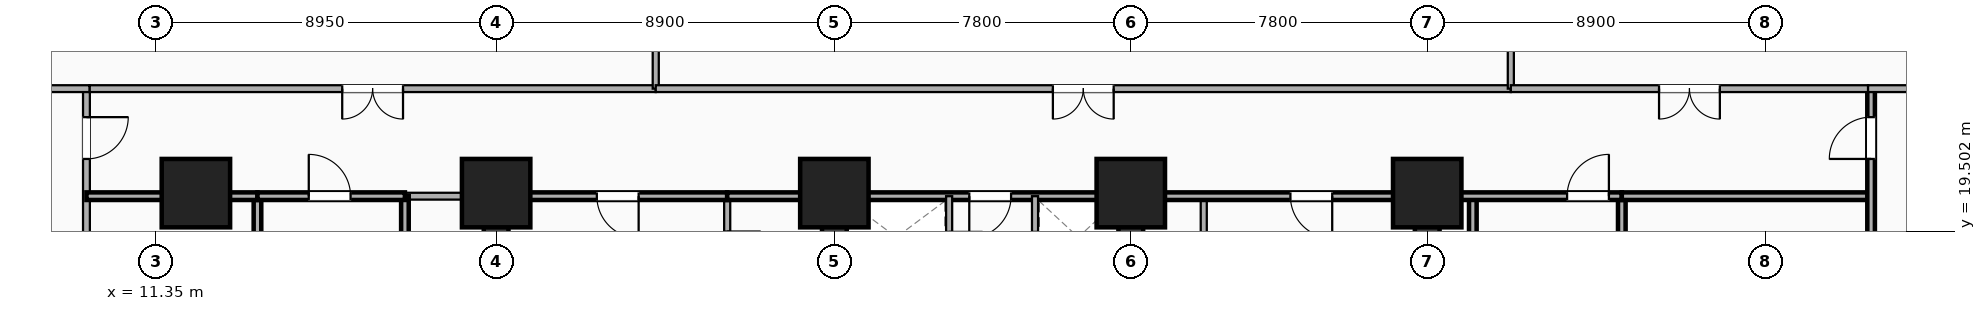
"""IFC4 building model, lengths in metres.
Left out: names, types, materials, properties, quantities, classifications, styles, units other than length and angle.
Written with IfcOpenShell. Run it as: python <this file> out.ifc"""

import sys

from ifc_helpers import new_model, si_unit, direction, frame, frame_2d, origin, origin_2d, place, context, subcontext, project, spatial, rectangle, extrude, element, fill, save


model = new_model("IFC4")
c1 = context("Model", 3, precision=1e-05, world=origin(), true_north=direction((0.0, 1.0)))
c2 = subcontext(c1, "Body", "Model", "MODEL_VIEW")
j1 = project(units=[si_unit("LENGTHUNIT", "METRE"), si_unit("PLANEANGLEUNIT", "RADIAN")], contexts=[c1])
p1 = place(None, origin())
s1 = spatial("IfcSite", under=j1, at=p1, CompositionType="ELEMENT")
p2 = place(p1, origin())
s2 = spatial("IfcBuilding", under=s1, at=p2, CompositionType="ELEMENT")
p3 = place(p2, frame((0.0, 0.0, 5.4)))
s3 = spatial("IfcBuildingStorey", under=s2, at=p3, CompositionType="ELEMENT", Elevation=5.4)
for number, where, z_axis, x_axis in (
    (1, (20.3, 3.5, 0.0), (0.0, 0.0, 1.0), (0.0, 1.0, 0.0)),
    (2, (44.8, 3.5, 0.0), (0.0, 0.0, 1.0), (0.0, 1.0, 0.0)),
):
    element("IfcWall", number, at=place(p3, frame(where, z_axis=z_axis, x_axis=x_axis)), inside=s3, PredefinedType="SHEAR", context=c2, shape_type="SweptSolid", body=[
        extrude(rectangle(XDim=16.9, YDim=0.65, at=frame_2d((8.45, 0.0))), origin(), (0.0, 0.0, 1.0), 4.3),
    ])
p4 = place(p3, frame((29.2, 3.5, 0.0), z_axis=(0.0, 0.0, 1.0), x_axis=(0.0, 1.0, 0.0)))
e3 = element("IfcWall", 3, at=p4, inside=s3, PredefinedType="SHEAR", context=c2, shape_type="SweptSolid", body=[
    extrude(rectangle(XDim=16.9, YDim=0.65, at=frame_2d((8.45, 0.0))), origin(), (0.0, 0.0, 1.0), 4.3),
])
p5 = place(p4, frame((7.75, 0.0, 0.0), z_axis=(0.0, 0.0, 1.0), x_axis=(-1.0, 0.0, 0.0)))
e4 = element("IfcOpeningElement", 4, at=p5, cuts=e3, PredefinedType="OPENING", context=c2, shape_type="SweptSolid", body=[
    extrude(rectangle(XDim=1.1, YDim=2.15, at=frame_2d((0.55, 1.075))), frame((0.0, 0.335, 0.0), z_axis=(0.0, -1.0, 0.0), x_axis=(1.0, 0.0, 0.0)), (0.0, 0.0, 1.0), 0.67),
])
p6 = place(p3, frame((37.0, 3.5, 0.0), z_axis=(0.0, 0.0, 1.0), x_axis=(0.0, 1.0, 0.0)))
e5 = element("IfcWall", 5, at=p6, inside=s3, PredefinedType="SHEAR", context=c2, shape_type="SweptSolid", body=[
    extrude(rectangle(XDim=16.9, YDim=0.65, at=frame_2d((8.45, 0.0))), origin(), (0.0, 0.0, 1.0), 4.3),
])
p7 = place(p6, frame((6.65, 0.0, 0.0)))
e6 = element("IfcOpeningElement", 6, at=p7, cuts=e5, PredefinedType="OPENING", context=c2, shape_type="SweptSolid", body=[
    extrude(rectangle(XDim=1.1, YDim=2.15, at=frame_2d((0.55, 1.075))), frame((0.0, 0.335, 0.0), z_axis=(0.0, -1.0, 0.0), x_axis=(1.0, 0.0, 0.0)), (0.0, 0.0, 1.0), 0.67),
])
for number, where, z_axis, x_axis in (
    (7, (20.3, 20.5, -0.3), (0.0, 0.0, 1.0), (1.0, 0.0, 0.0)),
    (8, (29.2, 20.5, -0.3), (0.0, 0.0, 1.0), (1.0, 0.0, 0.0)),
    (9, (37.0, 20.5, -0.3), (0.0, 0.0, 1.0), (1.0, 0.0, 0.0)),
    (10, (44.8, 20.5, -0.3), (0.0, 0.0, 1.0), (1.0, 0.0, 0.0)),
    (11, (12.4, 20.5, -0.3), (0.0, 0.0, 1.0), (1.0, 0.0, 0.0)),
):
    element("IfcColumn", number, at=place(p3, frame(where, z_axis=z_axis, x_axis=x_axis)), inside=s3, PredefinedType="COLUMN", context=c2, shape_type="SweptSolid", body=[
        extrude(rectangle(XDim=1.8, YDim=1.8, at=origin_2d()), origin(), (0.0, 0.0, 1.0), 4.6),
    ])
p8 = place(p3, frame((26.38, 17.76, 0.0), z_axis=(0.0, 0.0, 1.0), x_axis=(0.0, 1.0, 0.0)))
e12 = element("IfcWall", 12, at=p8, inside=s3, PredefinedType="PARTITIONING", context=c2, shape_type="SweptSolid", body=[
    extrude(rectangle(XDim=2.66, YDim=0.16, at=frame_2d((1.33, 0.0))), origin(), (0.0, 0.0, 1.0), 2.635),
])
p9 = place(p8, frame((0.85, 0.0, 0.0)))
e13 = element("IfcOpeningElement", 13, at=p9, cuts=e12, PredefinedType="OPENING", context=c2, shape_type="SweptSolid", body=[
    extrude(rectangle(XDim=0.88, YDim=2.08, at=frame_2d((0.44, 1.04))), frame((0.0, 0.09, 0.0), z_axis=(0.0, -1.0, 0.0), x_axis=(1.0, 0.0, 0.0)), (0.0, 0.0, 1.0), 0.18),
])
p10 = place(p3, frame((38.92, 17.76, 0.0), z_axis=(0.0, 0.0, 1.0), x_axis=(0.0, 1.0, 0.0)))
e14 = element("IfcWall", 14, at=p10, inside=s3, PredefinedType="PARTITIONING", context=c2, shape_type="SweptSolid", body=[
    extrude(rectangle(XDim=2.66, YDim=0.16, at=frame_2d((1.33, 0.0))), origin(), (0.0, 0.0, 1.0), 3.373),
])
p11 = place(p10, frame((1.14, 0.0, 0.0), z_axis=(0.0, 0.0, 1.0), x_axis=(-1.0, 0.0, 0.0)))
e15 = element("IfcOpeningElement", 15, at=p11, cuts=e14, PredefinedType="OPENING", context=c2, shape_type="SweptSolid", body=[
    extrude(rectangle(XDim=0.92, YDim=2.08, at=frame_2d((0.46, 1.04))), frame((0.0, 0.09, 0.0), z_axis=(0.0, -1.0, 0.0), x_axis=(1.0, 0.0, 0.0)), (0.0, 0.0, 1.0), 0.18),
])
p12 = place(p3, frame((20.65, 20.42, 0.0), z_axis=(0.0, 0.0, 1.0), x_axis=(1.0, 0.0, 0.0)))
e16 = element("IfcWall", 16, at=p12, inside=s3, PredefinedType="PARTITIONING", context=c2, shape_type="SweptSolid", body=[
    extrude(rectangle(XDim=5.73, YDim=0.2, at=frame_2d((2.865, 0.0))), origin(), (0.0, 0.0, 1.0), 2.635),
])
p13 = place(p12, frame((2.3, 0.0, 0.0)))
e17 = element("IfcOpeningElement", 17, at=p13, cuts=e16, PredefinedType="OPENING", context=c2, shape_type="SweptSolid", body=[
    extrude(rectangle(XDim=1.1, YDim=2.15, at=frame_2d((0.55, 1.075))), frame((0.0, 0.11, 0.0), z_axis=(0.0, -1.0, 0.0), x_axis=(1.0, 0.0, 0.0)), (0.0, 0.0, 1.0), 0.22),
])
p14 = place(p3, frame((26.38, 20.42, 0.0), z_axis=(0.0, 0.0, 1.0), x_axis=(1.0, 0.0, 0.0)))
e18 = element("IfcWall", 18, at=p14, inside=s3, PredefinedType="PARTITIONING", context=c2, shape_type="SweptSolid", body=[
    extrude(rectangle(XDim=2.82, YDim=0.2, at=frame_2d((1.41, 0.0))), origin(), (0.0, 0.0, 1.0), 2.635),
])
p15 = place(p3, frame((29.2, 20.42, 0.0), z_axis=(0.0, 0.0, 1.0), x_axis=(1.0, 0.0, 0.0)))
e19 = element("IfcWall", 19, at=p15, inside=s3, PredefinedType="PARTITIONING", context=c2, shape_type="SweptSolid", body=[
    extrude(rectangle(XDim=7.8, YDim=0.2, at=frame_2d((3.9, 0.0))), origin(), (0.0, 0.0, 1.0), 2.635),
])
p16 = place(p15, frame((3.55, 0.0, 0.0)))
e20 = element("IfcOpeningElement", 20, at=p16, cuts=e19, PredefinedType="OPENING", context=c2, shape_type="SweptSolid", body=[
    extrude(rectangle(XDim=1.1, YDim=2.15, at=frame_2d((0.55, 1.075))), frame((0.0, 0.11, 0.0), z_axis=(0.0, -1.0, 0.0), x_axis=(1.0, 0.0, 0.0)), (0.0, 0.0, 1.0), 0.22),
])
p17 = place(p3, frame((37.0, 20.42, 0.0), z_axis=(0.0, 0.0, 1.0), x_axis=(1.0, 0.0, 0.0)))
e21 = element("IfcWall", 21, at=p17, inside=s3, PredefinedType="PARTITIONING", context=c2, shape_type="SweptSolid", body=[
    extrude(rectangle(XDim=7.45, YDim=0.2, at=frame_2d((3.725, 0.0))), origin(), (0.0, 0.0, 1.0), 3.373),
])
p18 = place(p17, frame((4.2, 0.0, 0.0)))
e22 = element("IfcOpeningElement", 22, at=p18, cuts=e21, PredefinedType="OPENING", context=c2, shape_type="SweptSolid", body=[
    extrude(rectangle(XDim=1.1, YDim=2.15, at=frame_2d((0.55, 1.075))), frame((0.0, 0.11, 0.0), z_axis=(0.0, -1.0, 0.0), x_axis=(1.0, 0.0, 0.0)), (0.0, 0.0, 1.0), 0.22),
])
p19 = place(p3, frame((32.22, 12.5, 0.0), z_axis=(0.0, 0.0, 1.0), x_axis=(0.0, 1.0, 0.0)))
e23 = element("IfcWall", 23, at=p19, inside=s3, PredefinedType="PARTITIONING", context=c2, shape_type="SweptSolid", body=[
    extrude(rectangle(XDim=7.92, YDim=0.16, at=frame_2d((3.96, 0.0))), origin(), (0.0, 0.0, 1.0), 3.373),
])
p20 = place(p19, frame((6.1, 0.0, 0.0)))
e24 = element("IfcOpeningElement", 24, at=p20, cuts=e23, PredefinedType="OPENING", context=c2, shape_type="SweptSolid", body=[
    extrude(rectangle(XDim=0.88, YDim=2.08, at=frame_2d((0.44, 1.04))), frame((0.0, 0.09, 0.0), z_axis=(0.0, -1.0, 0.0), x_axis=(1.0, 0.0, 0.0)), (0.0, 0.0, 1.0), 0.18),
])
p21 = place(p3, frame((34.48, 12.5, 0.0), z_axis=(0.0, 0.0, 1.0), x_axis=(0.0, 1.0, 0.0)))
e25 = element("IfcWall", 25, at=p21, inside=s3, PredefinedType="PARTITIONING", context=c2, shape_type="SweptSolid", body=[
    extrude(rectangle(XDim=7.92, YDim=0.16, at=frame_2d((3.96, 0.0))), origin(), (0.0, 0.0, 1.0), 3.373),
])
p22 = place(p21, frame((6.98, 0.0, 0.0), z_axis=(0.0, 0.0, 1.0), x_axis=(-1.0, 0.0, 0.0)))
e26 = element("IfcOpeningElement", 26, at=p22, cuts=e25, PredefinedType="OPENING", context=c2, shape_type="SweptSolid", body=[
    extrude(rectangle(XDim=0.88, YDim=2.08, at=frame_2d((0.44, 1.04))), frame((0.0, 0.09, 0.0), z_axis=(0.0, -1.0, 0.0), x_axis=(1.0, 0.0, 0.0)), (0.0, 0.0, 1.0), 0.18),
])
p23 = place(p3, frame((17.9, 20.42, 0.0), z_axis=(0.0, 0.0, 1.0), x_axis=(1.0, 0.0, 0.0)))
e27 = element("IfcWall", 27, at=p23, inside=s3, PredefinedType="PARTITIONING", context=c2, shape_type="SweptSolid", body=[
    extrude(rectangle(XDim=2.4, YDim=0.18, at=frame_2d((1.2, 0.0))), origin(), (0.0, 0.0, 1.0), 2.635),
])
p24 = place(p3, frame((9.52, 0.22, 0.0), z_axis=(0.0, 0.0, 1.0), x_axis=(0.0, 1.0, 0.0)))
e28 = element("IfcWall", 28, at=p24, inside=s3, PredefinedType="PARTITIONING", context=c2, shape_type="SweptSolid", body=[
    extrude(rectangle(XDim=23.03, YDim=0.18, at=frame_2d((11.515, 0.0))), origin(), (0.0, 0.0, 1.0), 4.3),
])
p25 = place(p24, frame((21.18, 0.0, 0.0)))
e29 = element("IfcOpeningElement", 29, at=p25, cuts=e28, PredefinedType="OPENING", context=c2, shape_type="SweptSolid", body=[
    extrude(rectangle(XDim=1.1, YDim=2.15, at=frame_2d((0.55, 1.075))), frame((0.0, 0.1, 0.0), z_axis=(0.0, -1.0, 0.0), x_axis=(1.0, 0.0, 0.0)), (0.0, 0.0, 1.0), 0.2),
])
p26 = place(p3, frame((14.02, 17.42, 0.0), z_axis=(0.0, 0.0, 1.0), x_axis=(0.0, 1.0, 0.0)))
e30 = element("IfcWall", 30, at=p26, inside=s3, PredefinedType="PARTITIONING", context=c2, shape_type="SweptSolid", body=[
    extrude(rectangle(XDim=3.0, YDim=0.2, at=frame_2d((1.5, 0.0))), origin(), (0.0, 0.0, 1.0), 3.373),
])
p27 = place(p26, frame((0.332, 0.0, 0.0)))
e31 = element("IfcOpeningElement", 31, at=p27, cuts=e30, PredefinedType="OPENING", context=c2, shape_type="SweptSolid", body=[
    extrude(rectangle(XDim=0.88, YDim=2.08, at=frame_2d((0.44, 1.04))), frame((0.0, 0.11, 0.0), z_axis=(0.0, -1.0, 0.0), x_axis=(1.0, 0.0, 0.0)), (0.0, 0.0, 1.0), 0.22),
])
p28 = place(p3, frame((17.9, 11.4, 0.0), z_axis=(0.0, 0.0, 1.0), x_axis=(0.0, 1.0, 0.0)))
e32 = element("IfcWall", 32, at=p28, inside=s3, PredefinedType="PARTITIONING", context=c2, shape_type="SweptSolid", body=[
    extrude(rectangle(XDim=9.02, YDim=0.2, at=frame_2d((4.51, 0.0))), origin(), (0.0, 0.0, 1.0), 3.373),
])
p29 = place(p28, frame((4.52, 0.0, 0.0), z_axis=(0.0, 0.0, 1.0), x_axis=(-1.0, 0.0, 0.0)))
e33 = element("IfcOpeningElement", 33, at=p29, cuts=e32, PredefinedType="OPENING", context=c2, shape_type="SweptSolid", body=[
    extrude(rectangle(XDim=0.92, YDim=2.08, at=frame_2d((0.46, 1.04))), frame((0.0, 0.11, 0.0), z_axis=(0.0, -1.0, 0.0), x_axis=(1.0, 0.0, 0.0)), (0.0, 0.0, 1.0), 0.22),
])
p30 = place(p3, frame((9.52, 20.42, 0.0), z_axis=(0.0, 0.0, 1.0), x_axis=(1.0, 0.0, 0.0)))
e34 = element("IfcWall", 34, at=p30, inside=s3, PredefinedType="PARTITIONING", context=c2, shape_type="SweptSolid", body=[
    extrude(rectangle(XDim=4.5, YDim=0.2, at=frame_2d((2.25, 0.0))), origin(), (0.0, 0.0, 1.0), 3.373),
])
p31 = place(p3, frame((14.02, 20.42, 0.0), z_axis=(0.0, 0.0, 1.0), x_axis=(1.0, 0.0, 0.0)))
e35 = element("IfcWall", 35, at=p31, inside=s3, PredefinedType="PARTITIONING", context=c2, shape_type="SweptSolid", body=[
    extrude(rectangle(XDim=3.88, YDim=0.2, at=frame_2d((1.94, 0.0))), origin(), (0.0, 0.0, 1.0), 3.373),
])
p32 = place(p31, frame((2.45, 0.0, 0.0), z_axis=(0.0, 0.0, 1.0), x_axis=(-1.0, 0.0, 0.0)))
e36 = element("IfcOpeningElement", 36, at=p32, cuts=e35, PredefinedType="OPENING", context=c2, shape_type="SweptSolid", body=[
    extrude(rectangle(XDim=1.1, YDim=2.15, at=frame_2d((0.55, 1.075))), frame((0.0, 0.11, 0.0), z_axis=(0.0, -1.0, 0.0), x_axis=(1.0, 0.0, 0.0)), (0.0, 0.0, 1.0), 0.22),
])
p33 = place(p3, frame((46.0, 11.4, 0.0), z_axis=(0.0, 0.0, 1.0), x_axis=(0.0, 1.0, 0.0)))
e37 = element("IfcWall", 37, at=p33, inside=s3, PredefinedType="PARTITIONING", context=c2, shape_type="SweptSolid", body=[
    extrude(rectangle(XDim=9.02, YDim=0.2, at=frame_2d((4.51, 0.0))), origin(), (0.0, 0.0, 1.0), 3.373),
])
p34 = place(p3, frame((49.92, 13.92, 0.0), z_axis=(0.0, 0.0, 1.0), x_axis=(0.0, 1.0, 0.0)))
e38 = element("IfcWall", 38, at=p34, inside=s3, PredefinedType="PARTITIONING", context=c2, shape_type="SweptSolid", body=[
    extrude(rectangle(XDim=6.5, YDim=0.2, at=frame_2d((3.25, 0.0))), origin(), (0.0, 0.0, 1.0), 3.373),
])
p35 = place(p34, frame((3.5, 0.0, 0.0), z_axis=(0.0, 0.0, 1.0), x_axis=(-1.0, 0.0, 0.0)))
e39 = element("IfcOpeningElement", 39, at=p35, cuts=e38, PredefinedType="OPENING", context=c2, shape_type="SweptSolid", body=[
    extrude(rectangle(XDim=1.1, YDim=2.15, at=frame_2d((0.55, 1.075))), frame((0.0, 0.11, 0.0), z_axis=(0.0, -1.0, 0.0), x_axis=(1.0, 0.0, 0.0)), (0.0, 0.0, 1.0), 0.22),
])
p36 = place(p3, frame((44.8, 20.42, 0.0), z_axis=(0.0, 0.0, 1.0), x_axis=(1.0, 0.0, 0.0)))
e40 = element("IfcWall", 40, at=p36, inside=s3, PredefinedType="PARTITIONING", context=c2, shape_type="SweptSolid", body=[
    extrude(rectangle(XDim=5.12, YDim=0.2, at=frame_2d((2.56, 0.0))), origin(), (0.0, 0.0, 1.0), 3.373),
])
p37 = place(p36, frame((4.781, 0.0, 0.0), z_axis=(0.0, 0.0, 1.0), x_axis=(-1.0, 0.0, 0.0)))
e41 = element("IfcOpeningElement", 41, at=p37, cuts=e40, PredefinedType="OPENING", context=c2, shape_type="SweptSolid", body=[
    extrude(rectangle(XDim=1.1, YDim=2.15, at=frame_2d((0.55, 1.075))), frame((0.0, 0.11, 0.0), z_axis=(0.0, -1.0, 0.0), x_axis=(1.0, 0.0, 0.0)), (0.0, 0.0, 1.0), 0.22),
])
p38 = place(p3, frame((49.92, 20.42, 0.0), z_axis=(0.0, 0.0, 1.0), x_axis=(1.0, 0.0, 0.0)))
e42 = element("IfcWall", 42, at=p38, inside=s3, PredefinedType="PARTITIONING", context=c2, shape_type="SweptSolid", body=[
    extrude(rectangle(XDim=6.56, YDim=0.2, at=frame_2d((3.28, 0.0))), origin(), (0.0, 0.0, 1.0), 3.373),
])
p39 = place(p3, frame((56.48, 0.22, 0.0), z_axis=(0.0, 0.0, 1.0), x_axis=(0.0, 1.0, 0.0)))
e43 = element("IfcWall", 43, at=p39, inside=s3, PredefinedType="PARTITIONING", context=c2, shape_type="SweptSolid", body=[
    extrude(rectangle(XDim=23.03, YDim=0.2, at=frame_2d((11.515, 0.0))), origin(), (0.0, 0.0, 1.0), 3.373),
])
p40 = place(p39, frame((22.28, 0.0, 0.0), z_axis=(0.0, 0.0, 1.0), x_axis=(-1.0, 0.0, 0.0)))
e44 = element("IfcOpeningElement", 44, at=p40, cuts=e43, PredefinedType="OPENING", context=c2, shape_type="SweptSolid", body=[
    extrude(rectangle(XDim=1.1, YDim=2.15, at=frame_2d((0.55, 1.075))), frame((0.0, 0.11, 0.0), z_axis=(0.0, -1.0, 0.0), x_axis=(1.0, 0.0, 0.0)), (0.0, 0.0, 1.0), 0.22),
])
p41 = place(p3, frame((9.6, 23.25, 0.0), z_axis=(0.0, 0.0, 1.0), x_axis=(1.0, 0.0, 0.0)))
e45 = element("IfcWall", 45, at=p41, inside=s3, PredefinedType="PARTITIONING", context=c2, shape_type="SweptSolid", body=[
    extrude(rectangle(XDim=14.9, YDim=0.18, at=frame_2d((7.45, 0.0))), origin(), (0.0, 0.0, 1.0), 3.43),
])
p42 = place(p41, frame((6.65, 0.0, 0.0)))
e46 = element("IfcOpeningElement", 46, at=p42, cuts=e45, PredefinedType="OPENING", context=c2, shape_type="SweptSolid", body=[
    extrude(rectangle(XDim=1.6, YDim=2.22, at=frame_2d((0.8, 1.11))), frame((0.0, 0.1, 0.0), z_axis=(0.0, -1.0, 0.0), x_axis=(1.0, 0.0, 0.0)), (0.0, 0.0, 1.0), 0.2),
])
p43 = place(p3, frame((-2.28, 23.25, 0.0), z_axis=(0.0, 0.0, 1.0), x_axis=(1.0, 0.0, 0.0)))
e47 = element("IfcWall", 47, at=p43, inside=s3, PredefinedType="PARTITIONING", context=c2, shape_type="SweptSolid", body=[
    extrude(rectangle(XDim=11.88, YDim=0.18, at=frame_2d((5.94, 0.0))), origin(), (0.0, 0.0, 1.0), 3.43),
])
p44 = place(p3, frame((24.5, 23.25, 0.0), z_axis=(0.0, 0.0, 1.0), x_axis=(0.0, 1.0, 0.0)))
e48 = element("IfcWall", 48, at=p44, inside=s3, PredefinedType="PARTITIONING", context=c2, shape_type="SweptSolid", body=[
    extrude(rectangle(XDim=27.3, YDim=0.16, at=frame_2d((13.65, 0.0))), origin(), (0.0, 0.0, 1.0), 3.373),
])
p45 = place(p3, frame((24.5, 23.25, 0.0), z_axis=(0.0, 0.0, 1.0), x_axis=(1.0, 0.0, 0.0)))
e49 = element("IfcWall", 49, at=p45, inside=s3, PredefinedType="PARTITIONING", context=c2, shape_type="SweptSolid", body=[
    extrude(rectangle(XDim=22.5, YDim=0.18, at=frame_2d((11.25, 0.0))), origin(), (0.0, 0.0, 1.0), 3.43),
])
p46 = place(p45, frame((10.45, 0.0, 0.0)))
e50 = element("IfcOpeningElement", 50, at=p46, cuts=e49, PredefinedType="OPENING", context=c2, shape_type="SweptSolid", body=[
    extrude(rectangle(XDim=1.6, YDim=2.22, at=frame_2d((0.8, 1.11))), frame((0.0, 0.1, 0.0), z_axis=(0.0, -1.0, 0.0), x_axis=(1.0, 0.0, 0.0)), (0.0, 0.0, 1.0), 0.2),
])
p47 = place(p3, frame((47.0, 23.25, 0.0), z_axis=(0.0, 0.0, 1.0), x_axis=(0.0, 1.0, 0.0)))
e51 = element("IfcWall", 51, at=p47, inside=s3, PredefinedType="PARTITIONING", context=c2, shape_type="SweptSolid", body=[
    extrude(rectangle(XDim=27.3, YDim=0.16, at=frame_2d((13.65, 0.0))), origin(), (0.0, 0.0, 1.0), 3.373),
])
p48 = place(p3, frame((47.0, 23.25, 0.0), z_axis=(0.0, 0.0, 1.0), x_axis=(1.0, 0.0, 0.0)))
e52 = element("IfcWall", 52, at=p48, inside=s3, PredefinedType="PARTITIONING", context=c2, shape_type="SweptSolid", body=[
    extrude(rectangle(XDim=9.4, YDim=0.18, at=frame_2d((4.7, 0.0))), origin(), (0.0, 0.0, 1.0), 3.982),
])
p49 = place(p48, frame((3.9, 0.0, 0.0)))
e53 = element("IfcOpeningElement", 53, at=p49, cuts=e52, PredefinedType="OPENING", context=c2, shape_type="SweptSolid", body=[
    extrude(rectangle(XDim=1.6, YDim=2.22, at=frame_2d((0.8, 1.11))), frame((0.0, 0.1, 0.0), z_axis=(0.0, -1.0, 0.0), x_axis=(1.0, 0.0, 0.0)), (0.0, 0.0, 1.0), 0.2),
])
p50 = place(p3, frame((56.4, 23.25, 0.0), z_axis=(0.0, 0.0, 1.0), x_axis=(1.0, 0.0, 0.0)))
e54 = element("IfcWall", 54, at=p50, inside=s3, PredefinedType="PARTITIONING", context=c2, shape_type="SweptSolid", body=[
    extrude(rectangle(XDim=19.38, YDim=0.18, at=frame_2d((9.69, 0.0))), origin(), (0.0, 0.0, 1.0), 3.43),
])
p51 = place(p13, origin())
e55 = element("IfcDoor", 55, at=p51, inside=s3, OperationType="SINGLE_SWING_RIGHT", PredefinedType="DOOR", context=c2, shape_type="SweptSolid", body=[
    extrude(rectangle(XDim=1.1, YDim=2.15, at=frame_2d((0.55, 1.075))), frame((0.0, 0.025, 0.0), z_axis=(0.0, -1.0, 0.0), x_axis=(1.0, 0.0, 0.0)), (0.0, 0.0, 1.0), 0.05),
])
fill(e17, e55)
p52 = place(p16, origin())
e56 = element("IfcDoor", 56, at=p52, inside=s3, OperationType="SINGLE_SWING_LEFT", PredefinedType="DOOR", context=c2, shape_type="SweptSolid", body=[
    extrude(rectangle(XDim=1.1, YDim=2.15, at=frame_2d((0.55, 1.075))), frame((0.0, 0.025, 0.0), z_axis=(0.0, -1.0, 0.0), x_axis=(1.0, 0.0, 0.0)), (0.0, 0.0, 1.0), 0.05),
])
fill(e20, e56)
p53 = place(p18, origin())
e57 = element("IfcDoor", 57, at=p53, inside=s3, OperationType="SINGLE_SWING_RIGHT", PredefinedType="DOOR", context=c2, shape_type="SweptSolid", body=[
    extrude(rectangle(XDim=1.1, YDim=2.15, at=frame_2d((0.55, 1.075))), frame((0.0, 0.025, 0.0), z_axis=(0.0, -1.0, 0.0), x_axis=(1.0, 0.0, 0.0)), (0.0, 0.0, 1.0), 0.05),
])
fill(e22, e57)
p54 = place(p25, origin())
e58 = element("IfcDoor", 58, at=p54, inside=s3, OperationType="SINGLE_SWING_RIGHT", PredefinedType="DOOR", context=c2, shape_type="SweptSolid", body=[
    extrude(rectangle(XDim=1.1, YDim=2.15, at=frame_2d((0.55, 1.075))), frame((0.0, 0.025, 0.0), z_axis=(0.0, -1.0, 0.0), x_axis=(1.0, 0.0, 0.0)), (0.0, 0.0, 1.0), 0.05),
])
fill(e29, e58)
p55 = place(p32, origin())
e59 = element("IfcDoor", 59, at=p55, inside=s3, OperationType="SINGLE_SWING_LEFT", PredefinedType="DOOR", context=c2, shape_type="SweptSolid", body=[
    extrude(rectangle(XDim=1.1, YDim=2.15, at=frame_2d((0.55, 1.075))), frame((0.0, 0.025, 0.0), z_axis=(0.0, -1.0, 0.0), x_axis=(1.0, 0.0, 0.0)), (0.0, 0.0, 1.0), 0.05),
])
fill(e36, e59)
p56 = place(p37, origin())
e60 = element("IfcDoor", 60, at=p56, inside=s3, OperationType="SINGLE_SWING_RIGHT", PredefinedType="DOOR", context=c2, shape_type="SweptSolid", body=[
    extrude(rectangle(XDim=1.1, YDim=2.15, at=frame_2d((0.55, 1.075))), frame((0.0, 0.025, 0.0), z_axis=(0.0, -1.0, 0.0), x_axis=(1.0, 0.0, 0.0)), (0.0, 0.0, 1.0), 0.05),
])
fill(e41, e60)
p57 = place(p40, origin())
e61 = element("IfcDoor", 61, at=p57, inside=s3, OperationType="SINGLE_SWING_LEFT", PredefinedType="DOOR", context=c2, shape_type="SweptSolid", body=[
    extrude(rectangle(XDim=1.1, YDim=2.15, at=frame_2d((0.55, 1.075))), frame((0.0, 0.025, 0.0), z_axis=(0.0, -1.0, 0.0), x_axis=(1.0, 0.0, 0.0)), (0.0, 0.0, 1.0), 0.05),
])
fill(e44, e61)
p58 = place(p42, origin())
e62 = element("IfcDoor", 62, at=p58, inside=s3, OperationType="DOUBLE_DOOR_SINGLE_SWING", PredefinedType="DOOR", context=c2, shape_type="SweptSolid", body=[
    extrude(rectangle(XDim=1.6, YDim=2.22, at=frame_2d((0.8, 1.11))), frame((0.0, 0.025, 0.0), z_axis=(0.0, -1.0, 0.0), x_axis=(1.0, 0.0, 0.0)), (0.0, 0.0, 1.0), 0.05),
])
fill(e46, e62)
p59 = place(p46, origin())
e63 = element("IfcDoor", 63, at=p59, inside=s3, OperationType="DOUBLE_DOOR_SINGLE_SWING", PredefinedType="DOOR", context=c2, shape_type="SweptSolid", body=[
    extrude(rectangle(XDim=1.6, YDim=2.22, at=frame_2d((0.8, 1.11))), frame((0.0, 0.025, 0.0), z_axis=(0.0, -1.0, 0.0), x_axis=(1.0, 0.0, 0.0)), (0.0, 0.0, 1.0), 0.05),
])
fill(e50, e63)
p60 = place(p49, origin())
e64 = element("IfcDoor", 64, at=p60, inside=s3, OperationType="DOUBLE_DOOR_SINGLE_SWING", PredefinedType="DOOR", context=c2, shape_type="SweptSolid", body=[
    extrude(rectangle(XDim=1.6, YDim=2.22, at=frame_2d((0.8, 1.11))), frame((0.0, 0.025, 0.0), z_axis=(0.0, -1.0, 0.0), x_axis=(1.0, 0.0, 0.0)), (0.0, 0.0, 1.0), 0.05),
])
fill(e53, e64)
save(model, sys.argv[1])
